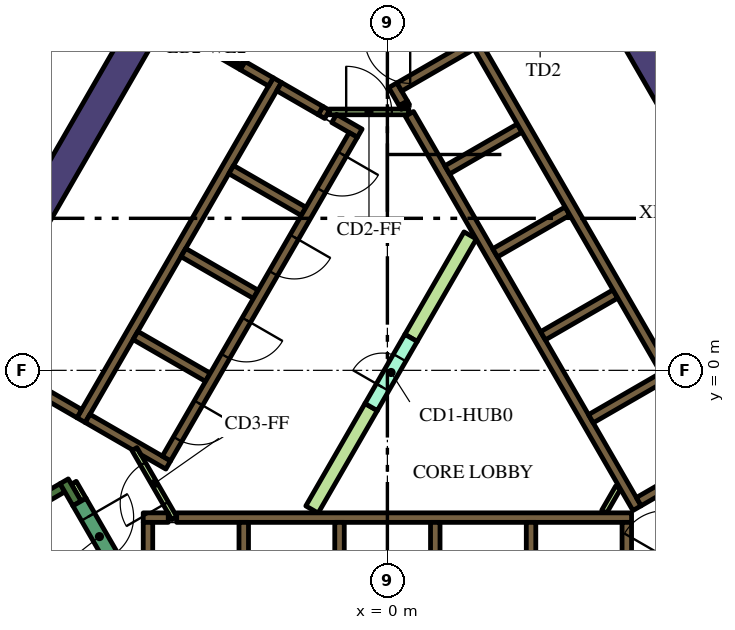
"""IFC4 building model, lengths in metres.
Left out: names, types, materials, properties, quantities, classifications, styles, units other than length and angle.
Written with IfcOpenShell. Run it as: python <this file> out.ifc"""

import sys

from ifc_helpers import new_model, si_unit, direction, frame, frame_2d, origin, place, context, subcontext, project, spatial, polyline, rectangle, outline, extrude, element, fill, save


model = new_model("IFC4")
c1 = context("Model", 3, precision=1e-05, world=origin(), true_north=direction((0.0, 1.0)))
c2 = subcontext(c1, "Body", "Model", "MODEL_VIEW")
j1 = project(units=[si_unit("LENGTHUNIT", "METRE"), si_unit("PLANEANGLEUNIT", "RADIAN")], contexts=[c1])
p1 = place(None, origin())
s1 = spatial("IfcSite", under=j1, at=p1, CompositionType="ELEMENT")
p2 = place(p1, origin())
s2 = spatial("IfcBuilding", under=s1, at=p2, CompositionType="ELEMENT")
p3 = place(p2, frame((0.0, 0.0, 187.8)))
s3 = spatial("IfcBuildingStorey", under=s2, at=p3, CompositionType="ELEMENT", Elevation=187.8)
p4 = place(p3, frame((8.279, 5.761, 0.0), z_axis=(0.0, 0.0, 1.0), x_axis=(-0.500024261398, 0.866011396007, 0.0)))
e1 = element("IfcWall", 1, at=p4, inside=s3, PredefinedType="SOLIDWALL", context=c2, shape_type="SweptSolid", body=[
    extrude(rectangle(XDim=4.528, YDim=0.8, at=frame_2d((2.264, 0.0))), origin(), (0.0, 0.0, 1.0), 4.2),
])
p5 = place(p3, frame((-12.668, -1.842, 0.0), z_axis=(0.0, 0.0, 1.0), x_axis=(0.500003640647, 0.866023301845, 0.0)))
e2 = element("IfcWall", 2, at=p5, inside=s3, PredefinedType="SOLIDWALL", context=c2, shape_type="SweptSolid", body=[
    extrude(rectangle(XDim=15.858, YDim=0.8, at=frame_2d((7.929, 0.0))), origin(), (0.0, 0.0, 1.0), 4.2),
])
p6 = place(p3, frame((-14.44, -6.49, 0.0), z_axis=(0.0, 0.0, 1.0), x_axis=(0.866022966069, 0.500004222222, 0.0)))
e3 = element("IfcWall", 3, at=p6, inside=s3, PredefinedType="SOLIDWALL", context=c2, shape_type="SweptSolid", body=[
    extrude(rectangle(XDim=6.8, YDim=0.25, at=frame_2d((3.4, 0.0))), origin(), (0.0, 0.0, 1.0), 4.2),
])
p7 = place(p3, frame((-8.168, -3.503, 0.0), z_axis=(0.0, 0.0, 1.0), x_axis=(-0.499952099219, 0.866053057547, 0.0)))
e4 = element("IfcWall", 4, at=p7, inside=s3, PredefinedType="SOLIDWALL", context=c2, shape_type="SweptSolid", body=[
    extrude(rectangle(XDim=0.675, YDim=0.25, at=frame_2d((0.337, 0.0))), origin(), (0.0, 0.0, 1.0), 4.2),
])
p8 = place(p3, frame((-5.545, -3.875, 0.0), z_axis=(0.0, 0.0, 1.0), x_axis=(1.0, 0.0, 0.0)))
e5 = element("IfcWall", 5, at=p8, inside=s3, PredefinedType="SOLIDWALL", context=c2, shape_type="SweptSolid", body=[
    extrude(rectangle(XDim=11.97, YDim=0.25, at=frame_2d((5.985, 0.0))), origin(), (0.0, 0.0, 1.0), 4.2),
])
p9 = place(p3, frame((-6.425, -3.875, 0.0), z_axis=(0.0, 0.0, 1.0), x_axis=(1.0, 0.0, 0.0)))
e6 = element("IfcWall", 6, at=p9, inside=s3, PredefinedType="SOLIDWALL", context=c2, shape_type="SweptSolid", body=[
    extrude(rectangle(XDim=0.658, YDim=0.25, at=frame_2d((0.329, 0.0))), origin(), (0.0, 0.0, 1.0), 4.2),
])
p10 = place(p3, frame((6.3, -7.24, 0.0), z_axis=(0.0, 0.0, 1.0), x_axis=(0.0, 1.0, 0.0)))
e7 = element("IfcWall", 7, at=p10, inside=s3, PredefinedType="SOLIDWALL", context=c2, shape_type="SweptSolid", body=[
    extrude(rectangle(XDim=3.24, YDim=0.25, at=frame_2d((1.62, 0.0))), origin(), (0.0, 0.0, 1.0), 4.2),
])
for number, where, z_axis, x_axis in (
    (8, (3.78, -4.0, 0.0), (0.0, 0.0, 1.0), (0.0, -1.0, 0.0)),
    (9, (1.26, -4.0, 0.0), (0.0, 0.0, 1.0), (0.0, -1.0, 0.0)),
    (10, (-1.26, -4.0, 0.0), (0.0, 0.0, 1.0), (0.0, -1.0, 0.0)),
    (11, (-3.78, -4.0, 0.0), (0.0, 0.0, 1.0), (0.0, -1.0, 0.0)),
):
    element("IfcWall", number, at=place(p3, frame(where, z_axis=z_axis, x_axis=x_axis)), inside=s3, PredefinedType="SOLIDWALL", context=c2, shape_type="SweptSolid", body=[
        extrude(rectangle(XDim=2.2, YDim=0.25, at=frame_2d((1.1, 0.0))), origin(), (0.0, 0.0, 1.0), 4.2),
    ])
p11 = place(p3, frame((-6.3, -7.125, 0.0), z_axis=(0.0, 0.0, 1.0), x_axis=(0.0, 1.0, 0.0)))
e12 = element("IfcWall", 12, at=p11, inside=s3, PredefinedType="SOLIDWALL", context=c2, shape_type="SweptSolid", body=[
    extrude(rectangle(XDim=3.125, YDim=0.25, at=frame_2d((1.562, 0.0))), origin(), (0.0, 0.0, 1.0), 4.2),
])
p12 = place(p3, frame((0.473, 6.93, 0.0), z_axis=(0.0, 0.0, 1.0), x_axis=(-0.49972245349, 0.866185586049, 0.0)))
e13 = element("IfcWall", 13, at=p12, inside=s3, PredefinedType="SOLIDWALL", context=c2, shape_type="SweptSolid", body=[
    extrude(rectangle(XDim=0.11, YDim=0.25, at=frame_2d((0.055, 0.0))), origin(), (0.0, 0.0, 1.0), 4.2),
])
p13 = place(p3, frame((6.568, -3.627, 0.0), z_axis=(0.0, 0.0, 1.0), x_axis=(-0.499999455981, 0.866025717874, 0.0)))
e14 = element("IfcWall", 14, at=p13, inside=s3, PredefinedType="SOLIDWALL", context=c2, shape_type="SweptSolid", body=[
    extrude(rectangle(XDim=11.978, YDim=0.25, at=frame_2d((5.989, 0.0))), origin(), (0.0, 0.0, 1.0), 4.2),
])
p14 = place(p3, frame((0.417, 7.027, 0.0), z_axis=(0.0, 0.0, 1.0), x_axis=(-0.500210807569, 0.865903659763, 0.0)))
e15 = element("IfcWall", 15, at=p14, inside=s3, PredefinedType="SOLIDWALL", context=c2, shape_type="SweptSolid", body=[
    extrude(rectangle(XDim=0.548, YDim=0.25, at=frame_2d((0.274, 0.0))), origin(), (0.0, 0.0, 1.0), 4.2),
])
p15 = place(p3, frame((3.647, 9.38, 0.0), z_axis=(0.0, 0.0, 1.0), x_axis=(-0.866025015791, -0.500000672024, 0.0)))
e16 = element("IfcWall", 16, at=p15, inside=s3, PredefinedType="SOLIDWALL", context=c2, shape_type="SweptSolid", body=[
    extrude(rectangle(XDim=3.849, YDim=0.25, at=frame_2d((1.924, 0.0))), origin(), (0.0, 0.0, 1.0), 4.2),
])
p16 = place(p3, frame((1.574, 5.274, 0.0), z_axis=(0.0, 0.0, 1.0), x_axis=(0.866028486751, 0.499994660107, 0.0)))
e17 = element("IfcWall", 17, at=p16, inside=s3, PredefinedType="SOLIDWALL", context=c2, shape_type="SweptSolid", body=[
    extrude(rectangle(XDim=2.2, YDim=0.25, at=frame_2d((1.1, 0.0))), origin(), (0.0, 0.0, 1.0), 4.2),
])
for number, where, z_axis, x_axis in (
    (18, (2.834, 3.091, 0.0), (0.0, 0.0, 1.0), (0.866, 0.5, 0.0)),
    (19, (4.094, 0.909, 0.0), (0.0, 0.0, 1.0), (0.866, 0.5, 0.0)),
    (20, (5.354, -1.274, 0.0), (0.0, 0.0, 1.0), (0.866, 0.5, 0.0)),
):
    element("IfcWall", number, at=place(p3, frame(where, z_axis=z_axis, x_axis=x_axis)), inside=s3, PredefinedType="SOLIDWALL", context=c2, shape_type="SweptSolid", body=[
        extrude(rectangle(XDim=2.2, YDim=0.25, at=frame_2d((1.1, 0.0))), origin(), (0.0, 0.0, 1.0), 4.2),
    ])
p17 = place(p3, frame((6.614, -3.456, 0.0), z_axis=(0.0, 0.0, 1.0), x_axis=(0.866032512851, 0.499987686533, 0.0)))
e21 = element("IfcWall", 21, at=p17, inside=s3, PredefinedType="SOLIDWALL", context=c2, shape_type="SweptSolid", body=[
    extrude(rectangle(XDim=2.975, YDim=0.25, at=frame_2d((1.487, 0.0))), origin(), (0.0, 0.0, 1.0), 4.2),
])
p18 = place(p3, frame((-8.06, -1.311, 0.0), z_axis=(0.0, 0.0, 1.0), x_axis=(0.50000273126, 0.866023826885, 0.0)))
e22 = element("IfcWall", 22, at=p18, inside=s3, PredefinedType="SOLIDWALL", context=c2, shape_type="SweptSolid", body=[
    extrude(rectangle(XDim=10.33, YDim=0.25, at=frame_2d((5.165, 0.0))), origin(), (0.0, 0.0, 1.0), 4.2),
])
p19 = place(p3, frame((-1.758, 6.835, 0.0), z_axis=(0.0, 0.0, 1.0), x_axis=(0.865982457891, -0.500074377092, 0.0)))
e23 = element("IfcWall", 23, at=p19, inside=s3, PredefinedType="SOLIDWALL", context=c2, shape_type="SweptSolid", body=[
    extrude(rectangle(XDim=0.2, YDim=0.25, at=frame_2d((0.1, 0.0))), origin(), (0.0, 0.0, 1.0), 4.2),
])
p20 = place(p3, frame((-1.76, 6.836, 0.0), z_axis=(0.0, 0.0, 1.0), x_axis=(-0.865952863304, 0.500125622755, 0.0)))
e24 = element("IfcWall", 24, at=p20, inside=s3, PredefinedType="SOLIDWALL", context=c2, shape_type="SweptSolid", body=[
    extrude(rectangle(XDim=1.258, YDim=0.25, at=frame_2d((0.629, 0.0))), origin(), (0.0, 0.0, 1.0), 4.2),
])
p21 = place(p3, frame((-0.728, 6.24, 0.0), z_axis=(0.0, 0.0, 1.0), x_axis=(-0.865955664968, 0.500120771724, 0.0)))
e25 = element("IfcWall", 25, at=p21, inside=s3, PredefinedType="SOLIDWALL", context=c2, shape_type="SweptSolid", body=[
    extrude(rectangle(XDim=0.778, YDim=0.25, at=frame_2d((0.389, 0.0))), origin(), (0.0, 0.0, 1.0), 4.2),
])
for number, where, z_axis, x_axis in (
    (26, (-2.204, 4.182, 0.0), (0.0, 0.0, 1.0), (-0.866, 0.5, 0.0)),
    (27, (-5.369, 3.1, 0.0), (0.0, 0.0, 1.0), (0.866, -0.5, 0.0)),
    (28, (-4.724, -0.182, 0.0), (0.0, 0.0, 1.0), (-0.866, 0.5, 0.0)),
):
    element("IfcWall", number, at=place(p3, frame(where, z_axis=z_axis, x_axis=x_axis)), inside=s3, PredefinedType="SOLIDWALL", context=c2, shape_type="SweptSolid", body=[
        extrude(rectangle(XDim=2.2, YDim=0.25, at=frame_2d((1.1, 0.0))), origin(), (0.0, 0.0, 1.0), 4.2),
    ])
p22 = place(p3, origin())
e29 = element("IfcWall", 29, at=p22, inside=s3, PredefinedType="SOLIDWALL", context=c2, shape_type="SweptSolid", body=[
    extrude(outline(polyline([(-5.922, -2.257), (-5.922, -2.257), (-5.705, -2.382), (-5.83, -2.598), (-6.483, -2.221), (-6.591, -2.033), (-6.591, -2.033), (-6.7, -2.096), (-7.952, -1.373), (-7.827, -1.156), (-5.922, -2.257)])), origin(), (0.0, 0.0, 1.0), 4.2),
])
p23 = place(p3, frame((-8.106, -1.14, 0.0), z_axis=(0.0, 0.0, 1.0), x_axis=(-0.866008981251, 0.500028443584, 0.0)))
e30 = element("IfcWall", 30, at=p23, inside=s3, PredefinedType="SOLIDWALL", context=c2, shape_type="SweptSolid", body=[
    extrude(rectangle(XDim=3.2, YDim=0.25, at=frame_2d((1.6, 0.0))), origin(), (0.0, 0.0, 1.0), 4.2),
])
p24 = place(p3, frame((-3.066, 7.59, 0.0), z_axis=(0.0, 0.0, 1.0), x_axis=(-0.866081358704, 0.49990307071, 0.0)))
e31 = element("IfcWall", 31, at=p24, inside=s3, PredefinedType="SOLIDWALL", context=c2, shape_type="SweptSolid", body=[
    extrude(rectangle(XDim=0.858, YDim=0.25, at=frame_2d((0.429, 0.0))), origin(), (0.0, 0.0, 1.0), 4.2),
])
e32 = element("IfcWall", 32, at=p22, inside=s3, PredefinedType="SOLIDWALL", context=c2, shape_type="SweptSolid", body=[
    extrude(outline(polyline([(-3.748, 8.128), (-3.813, 8.015), (-4.027, 8.139), (-4.017, 8.156), (-4.008, 8.173), (-4.0, 8.192), (-3.995, 8.21), (-3.991, 8.23), (-3.99, 8.25), (-3.99, 8.268), (-3.748, 8.128)])), origin(), (0.0, 0.0, 1.0), 4.2),
])
p25 = place(p3, frame((-8.252, -2.958, 0.0), z_axis=(0.0, 0.0, 1.0), x_axis=(0.500174715838, -0.865924508047, 0.0)))
e33 = element("IfcWall", 33, at=p25, inside=s3, PredefinedType="PARTITIONING", context=c2, shape_type="SweptSolid", body=[
    extrude(rectangle(XDim=0.514, YDim=0.15, at=frame_2d((0.257, 0.0))), origin(), (0.0, 0.0, 1.0), 3.15),
])
p26 = place(p3, frame((5.705, -3.718, 0.0), z_axis=(0.0, 0.0, 1.0), x_axis=(0.499962090823, 0.866047289552, 0.0)))
e34 = element("IfcWall", 34, at=p26, inside=s3, PredefinedType="PARTITIONING", context=c2, shape_type="SweptSolid", body=[
    extrude(rectangle(XDim=0.735, YDim=0.15, at=frame_2d((0.367, 0.0))), origin(), (0.0, 0.0, 1.0), 3.15),
])
e35 = element("IfcWall", 35, at=p22, inside=s3, PredefinedType="PARTITIONING", context=c2, shape_type="SweptSolid", body=[
    extrude(outline(polyline([(2.017, 3.643), (2.342, 3.456), (0.785, 0.76), (0.46, 0.947), (2.017, 3.643)])), origin(), (0.0, 0.0, 1.0), 3.15),
])
e36 = element("IfcWall", 36, at=p22, inside=s3, PredefinedType="PARTITIONING", context=c2, shape_type="SweptSolid", body=[
    extrude(outline(polyline([(-0.59, -0.872), (-0.265, -1.059), (-1.822, -3.756), (-2.147, -3.568), (-0.59, -0.872)])), origin(), (0.0, 0.0, 1.0), 3.15),
])
p27 = place(p3, frame((8.565, -2.185, 0.0), z_axis=(0.0, 0.0, 1.0), x_axis=(-0.499997954832, 0.866026584559, 0.0)))
e37 = element("IfcWall", 37, at=p27, inside=s3, PredefinedType="SOLIDWALL", context=c2, shape_type="SweptSolid", body=[
    extrude(rectangle(XDim=12.35, YDim=0.25, at=frame_2d((6.175, 0.0))), origin(), (0.0, 0.0, 1.0), 4.2),
])
p28 = place(p27, frame((0.585, 0.0, 0.0)))
e38 = element("IfcOpeningElement", 38, at=p28, cuts=e37, PredefinedType="OPENING", context=c2, shape_type="SweptSolid", body=[
    extrude(rectangle(XDim=1.1, YDim=2.1, at=frame_2d((0.55, 1.05))), frame((0.0, 0.135, 0.0), z_axis=(0.0, -1.0, 0.0), x_axis=(1.0, 0.0, 0.0)), (0.0, 0.0, 1.0), 0.27),
])
p29 = place(p3, frame((-0.898, 6.194, 0.0), z_axis=(0.0, 0.0, 1.0), x_axis=(-0.499996202215, -0.866027596426, 0.0)))
e39 = element("IfcWall", 39, at=p29, inside=s3, PredefinedType="SOLIDWALL", context=c2, shape_type="SweptSolid", body=[
    extrude(rectangle(XDim=9.83, YDim=0.25, at=frame_2d((4.915, 0.0))), origin(), (0.0, 0.0, 1.0), 4.2),
])
p30 = place(p29, frame((0.585, 0.0, 0.0)))
e40 = element("IfcOpeningElement", 40, at=p30, cuts=e39, PredefinedType="OPENING", context=c2, shape_type="SweptSolid", body=[
    extrude(rectangle(XDim=1.1, YDim=2.1, at=frame_2d((0.55, 1.05))), frame((0.0, 0.135, 0.0), z_axis=(0.0, -1.0, 0.0), x_axis=(1.0, 0.0, 0.0)), (0.0, 0.0, 1.0), 0.27),
])
p31 = place(p29, frame((3.105, 0.0, 0.0)))
e41 = element("IfcOpeningElement", 41, at=p31, cuts=e39, PredefinedType="OPENING", context=c2, shape_type="SweptSolid", body=[
    extrude(rectangle(XDim=1.1, YDim=2.1, at=frame_2d((0.55, 1.05))), frame((0.0, 0.135, 0.0), z_axis=(0.0, -1.0, 0.0), x_axis=(1.0, 0.0, 0.0)), (0.0, 0.0, 1.0), 0.27),
])
p32 = place(p29, frame((5.625, 0.0, 0.0)))
e42 = element("IfcOpeningElement", 42, at=p32, cuts=e39, PredefinedType="OPENING", context=c2, shape_type="SweptSolid", body=[
    extrude(rectangle(XDim=1.1, YDim=2.1, at=frame_2d((0.55, 1.05))), frame((0.0, 0.135, 0.0), z_axis=(0.0, -1.0, 0.0), x_axis=(1.0, 0.0, 0.0)), (0.0, 0.0, 1.0), 0.27),
])
p33 = place(p29, frame((8.145, 0.0, 0.0)))
e43 = element("IfcOpeningElement", 43, at=p33, cuts=e39, PredefinedType="OPENING", context=c2, shape_type="SweptSolid", body=[
    extrude(rectangle(XDim=1.1, YDim=2.1, at=frame_2d((0.55, 1.05))), frame((0.0, 0.135, 0.0), z_axis=(0.0, -1.0, 0.0), x_axis=(1.0, 0.0, 0.0)), (0.0, 0.0, 1.0), 0.27),
])
p34 = place(p3, frame((7.053, -5.284, 0.0), z_axis=(0.0, 0.0, 1.0), x_axis=(0.500078061341, 0.865980330357, 0.0)))
e44 = element("IfcWall", 44, at=p34, inside=s3, PredefinedType="SOLIDWALL", context=c2, shape_type="SweptSolid", body=[
    extrude(rectangle(XDim=2.1, YDim=0.4, at=frame_2d((1.05, 0.0))), origin(), (0.0, 0.0, 1.0), 4.2),
])
p35 = place(p34, frame((0.45, 0.0, 0.0)))
e45 = element("IfcOpeningElement", 45, at=p35, cuts=e44, PredefinedType="OPENING", context=c2, shape_type="SweptSolid", body=[
    extrude(rectangle(XDim=1.2, YDim=2.1, at=frame_2d((0.6, 1.05))), frame((0.0, 0.21, 0.0), z_axis=(0.0, -1.0, 0.0), x_axis=(1.0, 0.0, 0.0)), (0.0, 0.0, 1.0), 0.42),
])
p36 = place(p3, frame((-8.103, -3.466, 0.0), z_axis=(0.0, 0.0, 1.0), x_axis=(0.500078061341, -0.865980330357, 0.0)))
e46 = element("IfcWall", 46, at=p36, inside=s3, PredefinedType="SOLIDWALL", context=c2, shape_type="SweptSolid", body=[
    extrude(rectangle(XDim=2.1, YDim=0.4, at=frame_2d((1.05, 0.0))), origin(), (0.0, 0.0, 1.0), 4.2),
])
p37 = place(p36, frame((0.45, 0.0, 0.0)))
e47 = element("IfcOpeningElement", 47, at=p37, cuts=e46, PredefinedType="OPENING", context=c2, shape_type="SweptSolid", body=[
    extrude(rectangle(XDim=1.2, YDim=2.1, at=frame_2d((0.6, 1.05))), frame((0.0, 0.21, 0.0), z_axis=(0.0, -1.0, 0.0), x_axis=(1.0, 0.0, 0.0)), (0.0, 0.0, 1.0), 0.42),
])
p38 = place(p3, frame((-0.427, -0.966, 0.0), z_axis=(0.0, 0.0, 1.0), x_axis=(0.49994051562, 0.866059744384, 0.0)))
e48 = element("IfcWall", 48, at=p38, inside=s3, PredefinedType="PARTITIONING", context=c2, shape_type="SweptSolid", body=[
    extrude(rectangle(XDim=2.1, YDim=0.375, at=frame_2d((1.05, 0.0))), origin(), (0.0, 0.0, 1.0), 3.15),
])
p39 = place(p38, frame((0.6, 0.0, 0.0)))
e49 = element("IfcOpeningElement", 49, at=p39, cuts=e48, PredefinedType="OPENING", context=c2, shape_type="SweptSolid", body=[
    extrude(rectangle(XDim=0.9, YDim=2.1, at=frame_2d((0.45, 1.05))), frame((0.0, 0.198, 0.0), z_axis=(0.0, -1.0, 0.0), x_axis=(1.0, 0.0, 0.0)), (0.0, 0.0, 1.0), 0.395),
])
p40 = place(p3, frame((-1.534, 6.8, 0.0), z_axis=(0.0, 0.0, 1.0), x_axis=(1.0, 0.0, 0.0)))
e50 = element("IfcWall", 50, at=p40, inside=s3, PredefinedType="PARTITIONING", context=c2, shape_type="SweptSolid", body=[
    extrude(rectangle(XDim=2.1, YDim=0.15, at=frame_2d((1.05, 0.0))), origin(), (0.0, 0.0, 1.0), 3.15),
])
p41 = place(p40, frame((0.45, 0.0, 0.0)))
e51 = element("IfcOpeningElement", 51, at=p41, cuts=e50, PredefinedType="OPENING", context=c2, shape_type="SweptSolid", body=[
    extrude(rectangle(XDim=1.2, YDim=2.1, at=frame_2d((0.6, 1.05))), frame((0.0, 0.085, 0.0), z_axis=(0.0, -1.0, 0.0), x_axis=(1.0, 0.0, 0.0)), (0.0, 0.0, 1.0), 0.17),
])
p42 = place(p3, frame((-5.606, -3.89, 0.0), z_axis=(0.0, 0.0, 1.0), x_axis=(-0.500027713859, 0.866009402589, 0.0)))
e52 = element("IfcWall", 52, at=p42, inside=s3, PredefinedType="PARTITIONING", context=c2, shape_type="SweptSolid", body=[
    extrude(rectangle(XDim=2.1, YDim=0.15, at=frame_2d((1.05, 0.0))), origin(), (0.0, 0.0, 1.0), 3.15),
])
p43 = place(p42, frame((0.45, 0.0, 0.0)))
e53 = element("IfcOpeningElement", 53, at=p43, cuts=e52, PredefinedType="OPENING", context=c2, shape_type="SweptSolid", body=[
    extrude(rectangle(XDim=1.2, YDim=2.1, at=frame_2d((0.6, 1.05))), frame((0.0, 0.085, 0.0), z_axis=(0.0, -1.0, 0.0), x_axis=(1.0, 0.0, 0.0)), (0.0, 0.0, 1.0), 0.17),
])
p44 = place(p3, frame((-5.659, 9.012, 0.0), z_axis=(0.0, 0.0, 1.0), x_axis=(0.866009402589, -0.500027713859, 0.0)))
e54 = element("IfcWall", 54, at=p44, inside=s3, PredefinedType="PARTITIONING", context=c2, shape_type="SweptSolid", body=[
    extrude(rectangle(XDim=2.1, YDim=0.12, at=frame_2d((1.05, 0.0))), origin(), (0.0, 0.0, 1.0), 3.15),
])
p45 = place(p44, frame((0.45, 0.0, 0.0)))
e55 = element("IfcOpeningElement", 55, at=p45, cuts=e54, PredefinedType="OPENING", context=c2, shape_type="SweptSolid", body=[
    extrude(rectangle(XDim=1.2, YDim=2.1, at=frame_2d((0.6, 1.05))), frame((0.0, 0.07, 0.0), z_axis=(0.0, -1.0, 0.0), x_axis=(1.0, 0.0, 0.0)), (0.0, 0.0, 1.0), 0.14),
])
p46 = place(p3, frame((-8.859, 9.156, 0.0), z_axis=(0.0, 0.0, 1.0), x_axis=(-0.500010275428, -0.866019471182, 0.0)))
e56 = element("IfcWall", 56, at=p46, inside=s3, PredefinedType="PARTITIONING", context=c2, shape_type="SweptSolid", body=[
    extrude(rectangle(XDim=7.0, YDim=0.2, at=frame_2d((3.5, 0.0))), origin(), (0.0, 0.0, 1.0), 3.15),
])
p47 = place(p30, origin())
e57 = element("IfcDoor", 57, at=p47, inside=s3, OperationType="DOUBLE_DOOR_SLIDING", PredefinedType="DOOR", context=c2, shape_type="SweptSolid", body=[
    extrude(rectangle(XDim=1.1, YDim=2.1, at=frame_2d((0.55, 1.05))), frame((0.0, 0.025, 0.0), z_axis=(0.0, -1.0, 0.0), x_axis=(1.0, 0.0, 0.0)), (0.0, 0.0, 1.0), 0.05),
])
fill(e40, e57)
p48 = place(p31, origin())
e58 = element("IfcDoor", 58, at=p48, inside=s3, OperationType="DOUBLE_DOOR_SLIDING", PredefinedType="DOOR", context=c2, shape_type="SweptSolid", body=[
    extrude(rectangle(XDim=1.1, YDim=2.1, at=frame_2d((0.55, 1.05))), frame((0.0, 0.025, 0.0), z_axis=(0.0, -1.0, 0.0), x_axis=(1.0, 0.0, 0.0)), (0.0, 0.0, 1.0), 0.05),
])
fill(e41, e58)
p49 = place(p32, origin())
e59 = element("IfcDoor", 59, at=p49, inside=s3, OperationType="DOUBLE_DOOR_SLIDING", PredefinedType="DOOR", context=c2, shape_type="SweptSolid", body=[
    extrude(rectangle(XDim=1.1, YDim=2.1, at=frame_2d((0.55, 1.05))), frame((0.0, 0.025, 0.0), z_axis=(0.0, -1.0, 0.0), x_axis=(1.0, 0.0, 0.0)), (0.0, 0.0, 1.0), 0.05),
])
fill(e42, e59)
p50 = place(p33, origin())
e60 = element("IfcDoor", 60, at=p50, inside=s3, OperationType="DOUBLE_DOOR_SLIDING", PredefinedType="DOOR", context=c2, shape_type="SweptSolid", body=[
    extrude(rectangle(XDim=1.1, YDim=2.1, at=frame_2d((0.55, 1.05))), frame((0.0, 0.025, 0.0), z_axis=(0.0, -1.0, 0.0), x_axis=(1.0, 0.0, 0.0)), (0.0, 0.0, 1.0), 0.05),
])
fill(e43, e60)
p51 = place(p37, origin())
e61 = element("IfcDoor", 61, at=p51, inside=s3, OperationType="SINGLE_SWING_LEFT", PredefinedType="DOOR", context=c2, shape_type="SweptSolid", body=[
    extrude(rectangle(XDim=1.2, YDim=2.1, at=frame_2d((0.6, 1.05))), frame((0.0, 0.025, 0.0), z_axis=(0.0, -1.0, 0.0), x_axis=(1.0, 0.0, 0.0)), (0.0, 0.0, 1.0), 0.05),
])
fill(e47, e61)
p52 = place(p39, origin())
e62 = element("IfcDoor", 62, at=p52, inside=s3, OperationType="SINGLE_SWING_LEFT", PredefinedType="DOOR", context=c2, shape_type="SweptSolid", body=[
    extrude(rectangle(XDim=0.9, YDim=2.1, at=frame_2d((0.45, 1.05))), frame((0.0, 0.025, 0.0), z_axis=(0.0, -1.0, 0.0), x_axis=(1.0, 0.0, 0.0)), (0.0, 0.0, 1.0), 0.05),
])
fill(e49, e62)
p53 = place(p41, origin())
e63 = element("IfcDoor", 63, at=p53, inside=s3, OperationType="SINGLE_SWING_LEFT", PredefinedType="DOOR", context=c2, shape_type="SweptSolid", body=[
    extrude(rectangle(XDim=1.2, YDim=2.1, at=frame_2d((0.6, 1.05))), frame((0.0, 0.025, 0.0), z_axis=(0.0, -1.0, 0.0), x_axis=(1.0, 0.0, 0.0)), (0.0, 0.0, 1.0), 0.05),
])
fill(e51, e63)
p54 = place(p43, origin())
e64 = element("IfcDoor", 64, at=p54, inside=s3, OperationType="SINGLE_SWING_LEFT", PredefinedType="DOOR", context=c2, shape_type="SweptSolid", body=[
    extrude(rectangle(XDim=1.2, YDim=2.1, at=frame_2d((0.6, 1.05))), frame((0.0, 0.025, 0.0), z_axis=(0.0, -1.0, 0.0), x_axis=(1.0, 0.0, 0.0)), (0.0, 0.0, 1.0), 0.05),
])
fill(e53, e64)
p55 = place(p45, origin())
e65 = element("IfcDoor", 65, at=p55, inside=s3, OperationType="SINGLE_SWING_LEFT", PredefinedType="DOOR", context=c2, shape_type="SweptSolid", body=[
    extrude(rectangle(XDim=1.2, YDim=2.1, at=frame_2d((0.6, 1.05))), frame((0.0, 0.025, 0.0), z_axis=(0.0, -1.0, 0.0), x_axis=(1.0, 0.0, 0.0)), (0.0, 0.0, 1.0), 0.05),
])
fill(e55, e65)
save(model, sys.argv[1])
